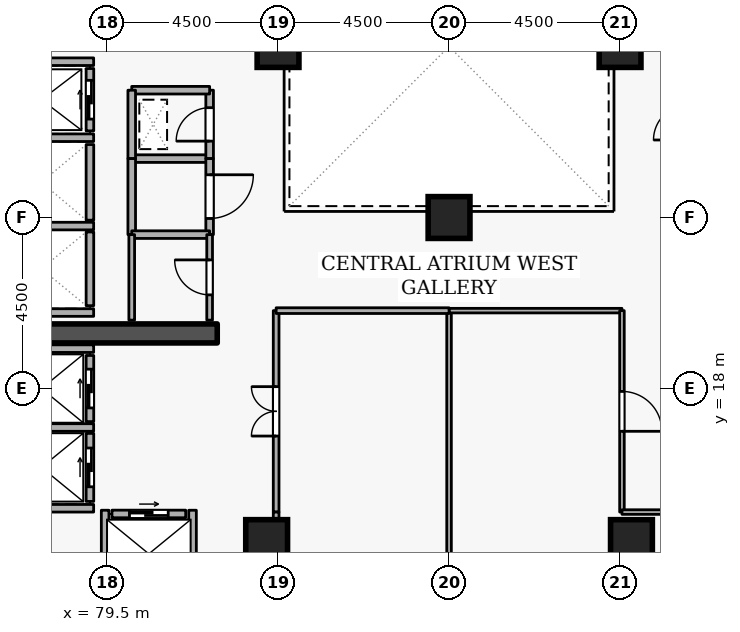
"""IFC4 building model, lengths in metres.
Left out: names, types, materials, properties, quantities, classifications, styles, units other than length and angle.
Written with IfcOpenShell. Run it as: python <this file> out.ifc"""

import sys

from ifc_helpers import new_model, si_unit, direction, frame, frame_2d, origin, origin_2d, place, context, subcontext, project, spatial, rectangle, extrude, element, fill, save


model = new_model("IFC4")
c1 = context("Model", 3, precision=1e-05, world=origin(), true_north=direction((0.0, 1.0)))
c2 = subcontext(c1, "Body", "Model", "MODEL_VIEW")
j1 = project(units=[si_unit("LENGTHUNIT", "METRE"), si_unit("PLANEANGLEUNIT", "RADIAN")], contexts=[c1])
p1 = place(None, origin())
s1 = spatial("IfcSite", under=j1, at=p1, CompositionType="ELEMENT")
p2 = place(p1, origin())
s2 = spatial("IfcBuilding", under=s1, at=p2, CompositionType="ELEMENT")
p3 = place(p2, frame((0.0, 0.0, 156.3)))
s3 = spatial("IfcBuildingStorey", under=s2, at=p3, CompositionType="ELEMENT", Elevation=156.3)
p4 = place(p3, frame((76.6, 19.45, 0.0), z_axis=(0.0, 0.0, 1.0), x_axis=(1.0, 0.0, 0.0)))
e1 = element("IfcWall", 1, at=p4, inside=s3, PredefinedType="SHEAR", context=c2, shape_type="SweptSolid", body=[
    extrude(rectangle(XDim=5.8, YDim=0.5, at=frame_2d((2.9, 0.0))), origin(), (0.0, 0.0, 1.0), 3.6),
])
for number, where, z_axis, x_axis in (
    (2, (93.3, 14.0, 0.0), (0.0, 0.0, 1.0), (1.0, 0.0, 0.0)),
    (3, (83.7, 14.0, 0.0), (0.0, 0.0, 1.0), (1.0, 0.0, 0.0)),
    (4, (93.0, 27.0, 0.0), (0.0, 0.0, 1.0), (1.0, 0.0, 0.0)),
    (5, (84.0, 27.0, 0.0), (0.0, 0.0, 1.0), (1.0, 0.0, 0.0)),
    (6, (88.5, 22.5, 0.0), (0.0, 0.0, 1.0), (1.0, 0.0, 0.0)),
):
    element("IfcColumn", number, at=place(p3, frame(where, z_axis=z_axis, x_axis=x_axis)), inside=s3, PredefinedType="COLUMN", context=c2, shape_type="SweptSolid", body=[
        extrude(rectangle(XDim=1.1, YDim=1.1, at=origin_2d()), origin(), (0.0, 0.0, 1.0), 3.6),
    ])
p5 = place(p3, frame((79.05, 24.78, 0.0), z_axis=(0.0, 0.0, 1.0), x_axis=(0.0, 1.0, 0.0)))
e7 = element("IfcWall", 7, at=p5, inside=s3, PredefinedType="STANDARD", context=c2, shape_type="SweptSolid", body=[
    extrude(rectangle(XDim=1.64, YDim=0.2, at=frame_2d((0.82, 0.0))), origin(), (0.0, 0.0, 1.0), 3.34),
])
p6 = place(p5, frame((0.31, 0.0, 0.0)))
e8 = element("IfcOpeningElement", 8, at=p6, cuts=e7, PredefinedType="OPENING", context=c2, shape_type="SweptSolid", body=[
    extrude(rectangle(XDim=1.02, YDim=2.06, at=frame_2d((0.51, 1.03))), frame((0.0, 0.11, 0.0), z_axis=(0.0, -1.0, 0.0), x_axis=(1.0, 0.0, 0.0)), (0.0, 0.0, 1.0), 0.22),
])
p7 = place(p3, frame((79.05, 22.43, 0.0), z_axis=(0.0, 0.0, 1.0), x_axis=(0.0, 1.0, 0.0)))
e9 = element("IfcWall", 9, at=p7, inside=s3, PredefinedType="STANDARD", context=c2, shape_type="SweptSolid", body=[
    extrude(rectangle(XDim=1.99, YDim=0.2, at=frame_2d((0.995, 0.0))), origin(), (0.0, 0.0, 1.0), 3.34),
])
p8 = place(p3, frame((79.05, 20.18, 0.0), z_axis=(0.0, 0.0, 1.0), x_axis=(0.0, 1.0, 0.0)))
e10 = element("IfcWall", 10, at=p8, inside=s3, PredefinedType="STANDARD", context=c2, shape_type="SweptSolid", body=[
    extrude(rectangle(XDim=1.94, YDim=0.2, at=frame_2d((0.97, 0.0))), origin(), (0.0, 0.0, 1.0), 3.34),
])
p9 = place(p3, frame((79.05, 17.13, 0.0), z_axis=(0.0, 0.0, 1.0), x_axis=(0.0, 1.0, 0.0)))
e11 = element("IfcWall", 11, at=p9, inside=s3, PredefinedType="STANDARD", context=c2, shape_type="SweptSolid", body=[
    extrude(rectangle(XDim=1.74, YDim=0.2, at=frame_2d((0.87, 0.0))), origin(), (0.0, 0.0, 1.0), 3.34),
])
p10 = place(p9, frame((0.36, 0.0, 0.0)))
e12 = element("IfcOpeningElement", 12, at=p10, cuts=e11, PredefinedType="OPENING", context=c2, shape_type="SweptSolid", body=[
    extrude(rectangle(XDim=1.02, YDim=2.06, at=frame_2d((0.51, 1.03))), frame((0.0, 0.11, 0.0), z_axis=(0.0, -1.0, 0.0), x_axis=(1.0, 0.0, 0.0)), (0.0, 0.0, 1.0), 0.22),
])
p11 = place(p3, frame((79.05, 15.03, 0.0), z_axis=(0.0, 0.0, 1.0), x_axis=(0.0, 1.0, 0.0)))
e13 = element("IfcWall", 13, at=p11, inside=s3, PredefinedType="STANDARD", context=c2, shape_type="SweptSolid", body=[
    extrude(rectangle(XDim=1.79, YDim=0.2, at=frame_2d((0.895, 0.0))), origin(), (0.0, 0.0, 1.0), 3.34),
])
p12 = place(p11, frame((0.385, 0.0, 0.0)))
e14 = element("IfcOpeningElement", 14, at=p12, cuts=e13, PredefinedType="OPENING", context=c2, shape_type="SweptSolid", body=[
    extrude(rectangle(XDim=1.02, YDim=2.06, at=frame_2d((0.51, 1.03))), frame((0.0, 0.11, 0.0), z_axis=(0.0, -1.0, 0.0), x_axis=(1.0, 0.0, 0.0)), (0.0, 0.0, 1.0), 0.22),
])
p13 = place(p3, frame((79.63, 14.7, 0.0), z_axis=(0.0, 0.0, 1.0), x_axis=(1.0, 0.0, 0.0)))
e15 = element("IfcWall", 15, at=p13, inside=s3, PredefinedType="STANDARD", context=c2, shape_type="SweptSolid", body=[
    extrude(rectangle(XDim=1.94, YDim=0.2, at=frame_2d((0.97, 0.0))), origin(), (0.0, 0.0, 1.0), 3.34),
])
p14 = place(p13, frame((0.46, 0.0, 0.0)))
e16 = element("IfcOpeningElement", 16, at=p14, cuts=e15, PredefinedType="OPENING", context=c2, shape_type="SweptSolid", body=[
    extrude(rectangle(XDim=1.02, YDim=2.06, at=frame_2d((0.51, 1.03))), frame((0.0, 0.11, 0.0), z_axis=(0.0, -1.0, 0.0), x_axis=(1.0, 0.0, 0.0)), (0.0, 0.0, 1.0), 0.22),
])
for number, where, z_axis, x_axis in (
    (17, (76.612, 26.6, 0.0), (0.0, 0.0, 1.0), (1.0, 0.0, 0.0)),
    (18, (76.612, 24.6, 0.0), (0.0, 0.0, 1.0), (1.0, 0.0, 0.0)),
    (19, (76.612, 22.275, 0.0), (0.0, 0.0, 1.0), (1.0, 0.0, 0.0)),
    (20, (76.612, 20.0, 0.0), (0.0, 0.0, 1.0), (1.0, 0.0, 0.0)),
):
    element("IfcWall", number, at=place(p3, frame(where, z_axis=z_axis, x_axis=x_axis)), inside=s3, PredefinedType="STANDARD", context=c2, shape_type="SweptSolid", body=[
        extrude(rectangle(XDim=2.536, YDim=0.2, at=frame_2d((1.268, 0.0))), origin(), (0.0, 0.0, 1.0), 3.34),
    ])
p15 = place(p3, frame((76.402, 19.05, 0.0), z_axis=(0.0, 0.0, 1.0), x_axis=(1.0, 0.0, 0.0)))
e21 = element("IfcWall", 21, at=p15, inside=s3, PredefinedType="STANDARD", context=c2, shape_type="SweptSolid", body=[
    extrude(rectangle(XDim=2.746, YDim=0.2, at=frame_2d((1.373, 0.0))), origin(), (0.0, 0.0, 1.0), 2.545),
])
p16 = place(p3, frame((76.402, 16.975, 0.0), z_axis=(0.0, 0.0, 1.0), x_axis=(1.0, 0.0, 0.0)))
e22 = element("IfcWall", 22, at=p16, inside=s3, PredefinedType="STANDARD", context=c2, shape_type="SweptSolid", body=[
    extrude(rectangle(XDim=2.746, YDim=0.2, at=frame_2d((1.373, 0.0))), origin(), (0.0, 0.0, 1.0), 3.34),
])
p17 = place(p3, frame((76.512, 14.85, 0.0), z_axis=(0.0, 0.0, 1.0), x_axis=(1.0, 0.0, 0.0)))
e23 = element("IfcWall", 23, at=p17, inside=s3, PredefinedType="STANDARD", context=c2, shape_type="SweptSolid", body=[
    extrude(rectangle(XDim=2.636, YDim=0.2, at=frame_2d((1.318, 0.0))), origin(), (0.0, 0.0, 1.0), 3.34),
])
for number, where, z_axis, x_axis in (
    (24, (81.75, 12.612, 0.0), (0.0, 0.0, 1.0), (0.0, 1.0, 0.0)),
    (25, (79.45, 12.612, 0.0), (0.0, 0.0, 1.0), (0.0, 1.0, 0.0)),
):
    element("IfcWall", number, at=place(p3, frame(where, z_axis=z_axis, x_axis=x_axis)), inside=s3, PredefinedType="STANDARD", context=c2, shape_type="SweptSolid", body=[
        extrude(rectangle(XDim=2.186, YDim=0.2, at=frame_2d((1.093, 0.0))), origin(), (0.0, 0.0, 1.0), 3.34),
    ])
p18 = place(p3, frame((80.15, 24.05, 0.0), z_axis=(0.0, 0.0, 1.0), x_axis=(1.0, 0.0, 0.0)))
e26 = element("IfcWall", 26, at=p18, inside=s3, PredefinedType="STANDARD", context=c2, shape_type="SweptSolid", body=[
    extrude(rectangle(XDim=2.05, YDim=0.2, at=frame_2d((1.025, 0.0))), origin(), (0.0, 0.0, 1.0), 3.34),
])
p19 = place(p3, frame((82.2, 24.05, 0.0), z_axis=(0.0, 0.0, 1.0), x_axis=(0.0, 1.0, 0.0)))
e27 = element("IfcWall", 27, at=p19, inside=s3, PredefinedType="STANDARD", context=c2, shape_type="SweptSolid", body=[
    extrude(rectangle(XDim=1.8, YDim=0.2, at=frame_2d((0.9, 0.0))), origin(), (0.0, 0.0, 1.0), 3.34),
])
p20 = place(p19, frame((0.46, 0.0, 0.0)))
e28 = element("IfcOpeningElement", 28, at=p20, cuts=e27, PredefinedType="OPENING", context=c2, shape_type="SweptSolid", body=[
    extrude(rectangle(XDim=0.88, YDim=2.04, at=frame_2d((0.44, 1.02))), frame((0.0, 0.11, 0.0), z_axis=(0.0, -1.0, 0.0), x_axis=(1.0, 0.0, 0.0)), (0.0, 0.0, 1.0), 0.22),
])
p21 = place(p3, frame((82.2, 25.85, 0.0), z_axis=(0.0, 0.0, 1.0), x_axis=(-1.0, 0.0, 0.0)))
e29 = element("IfcWall", 29, at=p21, inside=s3, PredefinedType="STANDARD", context=c2, shape_type="SweptSolid", body=[
    extrude(rectangle(XDim=2.05, YDim=0.2, at=frame_2d((1.025, 0.0))), origin(), (0.0, 0.0, 1.0), 3.34),
])
p22 = place(p3, frame((80.15, 25.85, 0.0), z_axis=(0.0, 0.0, 1.0), x_axis=(0.0, -1.0, 0.0)))
e30 = element("IfcWall", 30, at=p22, inside=s3, PredefinedType="STANDARD", context=c2, shape_type="SweptSolid", body=[
    extrude(rectangle(XDim=1.8, YDim=0.2, at=frame_2d((0.9, 0.0))), origin(), (0.0, 0.0, 1.0), 3.34),
])
p23 = place(p3, frame((80.15, 22.05, 0.0), z_axis=(0.0, 0.0, 1.0), x_axis=(0.0, 1.0, 0.0)))
e31 = element("IfcWall", 31, at=p23, inside=s3, PredefinedType="STANDARD", context=c2, shape_type="SweptSolid", body=[
    extrude(rectangle(XDim=2.0, YDim=0.2, at=frame_2d((1.0, 0.0))), origin(), (0.0, 0.0, 1.0), 3.34),
])
p24 = place(p3, frame((82.2, 24.05, 0.0), z_axis=(0.0, 0.0, 1.0), x_axis=(0.0, -1.0, 0.0)))
e32 = element("IfcWall", 32, at=p24, inside=s3, PredefinedType="STANDARD", context=c2, shape_type="SweptSolid", body=[
    extrude(rectangle(XDim=2.0, YDim=0.2, at=frame_2d((1.0, 0.0))), origin(), (0.0, 0.0, 1.0), 3.34),
])
p25 = place(p24, frame((0.425, 0.0, 0.0)))
e33 = element("IfcOpeningElement", 33, at=p25, cuts=e32, PredefinedType="OPENING", context=c2, shape_type="SweptSolid", body=[
    extrude(rectangle(XDim=1.15, YDim=2.1, at=frame_2d((0.575, 1.05))), frame((0.0, 0.11, 0.0), z_axis=(0.0, -1.0, 0.0), x_axis=(1.0, 0.0, 0.0)), (0.0, 0.0, 1.0), 0.22),
])
p26 = place(p3, frame((82.2, 22.05, 0.0), z_axis=(0.0, 0.0, 1.0), x_axis=(-1.0, 0.0, 0.0)))
e34 = element("IfcWall", 34, at=p26, inside=s3, PredefinedType="STANDARD", context=c2, shape_type="SweptSolid", body=[
    extrude(rectangle(XDim=2.05, YDim=0.2, at=frame_2d((1.025, 0.0))), origin(), (0.0, 0.0, 1.0), 3.34),
])
p27 = place(p3, frame((82.2, 19.8, 0.0), z_axis=(0.0, 0.0, 1.0), x_axis=(0.0, 1.0, 0.0)))
e35 = element("IfcWall", 35, at=p27, inside=s3, PredefinedType="PARTITIONING", context=c2, shape_type="SweptSolid", body=[
    extrude(rectangle(XDim=2.25, YDim=0.15, at=frame_2d((1.125, 0.0))), origin(), (0.0, 0.0, 1.0), 3.34),
])
p28 = place(p27, frame((0.665, 0.0, 0.0)))
e36 = element("IfcOpeningElement", 36, at=p28, cuts=e35, PredefinedType="OPENING", context=c2, shape_type="SweptSolid", body=[
    extrude(rectangle(XDim=0.92, YDim=2.08, at=frame_2d((0.46, 1.04))), frame((0.0, 0.085, 0.0), z_axis=(0.0, -1.0, 0.0), x_axis=(1.0, 0.0, 0.0)), (0.0, 0.0, 1.0), 0.17),
])
p29 = place(p3, frame((80.15, 22.05, 0.0), z_axis=(0.0, 0.0, 1.0), x_axis=(0.0, -1.0, 0.0)))
e37 = element("IfcWall", 37, at=p29, inside=s3, PredefinedType="PARTITIONING", context=c2, shape_type="SweptSolid", body=[
    extrude(rectangle(XDim=2.25, YDim=0.15, at=frame_2d((1.125, 0.0))), origin(), (0.0, 0.0, 1.0), 3.34),
])
p30 = place(p3, frame((88.5, 9.28, 0.0), z_axis=(0.0, 0.0, 1.0), x_axis=(0.0, 1.0, 0.0)))
e38 = element("IfcWall", 38, at=p30, inside=s3, PredefinedType="PARTITIONING", context=c2, shape_type="SweptSolid", body=[
    extrude(rectangle(XDim=10.77, YDim=0.12, at=frame_2d((5.385, 0.0))), origin(), (0.0, 0.0, 1.0), 2.932),
])
p31 = place(p3, frame((88.5, 20.05, 0.0), z_axis=(0.0, 0.0, 1.0), x_axis=(1.0, 0.0, 0.0)))
e39 = element("IfcWall", 39, at=p31, inside=s3, PredefinedType="PARTITIONING", context=c2, shape_type="SweptSolid", body=[
    extrude(rectangle(XDim=4.55, YDim=0.12, at=frame_2d((2.275, 0.0))), origin(), (0.0, 0.0, 1.0), 3.34),
])
p32 = place(p3, frame((93.05, 20.05, 0.0), z_axis=(0.0, 0.0, 1.0), x_axis=(0.0, -1.0, 0.0)))
e40 = element("IfcWall", 40, at=p32, inside=s3, PredefinedType="PARTITIONING", context=c2, shape_type="SweptSolid", body=[
    extrude(rectangle(XDim=5.3, YDim=0.12, at=frame_2d((2.65, 0.0))), origin(), (0.0, 0.0, 1.0), 3.34),
])
p33 = place(p32, frame((2.125, 0.0, 0.0)))
e41 = element("IfcOpeningElement", 41, at=p33, cuts=e40, PredefinedType="OPENING", context=c2, shape_type="SweptSolid", body=[
    extrude(rectangle(XDim=1.05, YDim=2.1, at=frame_2d((0.525, 1.05))), frame((0.0, 0.07, 0.0), z_axis=(0.0, -1.0, 0.0), x_axis=(1.0, 0.0, 0.0)), (0.0, 0.0, 1.0), 0.14),
])
p34 = place(p3, frame((93.05, 14.75, 0.0), z_axis=(0.0, 0.0, 1.0), x_axis=(1.0, 0.0, 0.0)))
e42 = element("IfcWall", 42, at=p34, inside=s3, PredefinedType="PARTITIONING", context=c2, shape_type="SweptSolid", body=[
    extrude(rectangle(XDim=1.75, YDim=0.12, at=frame_2d((0.875, 0.0))), origin(), (0.0, 0.0, 1.0), 3.34),
])
p35 = place(p3, frame((83.95, 14.75, 0.0), z_axis=(0.0, 0.0, 1.0), x_axis=(0.0, 1.0, 0.0)))
e43 = element("IfcWall", 43, at=p35, inside=s3, PredefinedType="PARTITIONING", context=c2, shape_type="SweptSolid", body=[
    extrude(rectangle(XDim=5.3, YDim=0.15, at=frame_2d((2.65, 0.0))), origin(), (0.0, 0.0, 1.0), 3.34),
])
p36 = place(p35, frame((2.0, 0.0, 0.0)))
e44 = element("IfcOpeningElement", 44, at=p36, cuts=e43, PredefinedType="OPENING", context=c2, shape_type="SweptSolid", body=[
    extrude(rectangle(XDim=1.3, YDim=2.12, at=frame_2d((0.65, 1.06))), frame((0.0, 0.085, 0.0), z_axis=(0.0, -1.0, 0.0), x_axis=(1.0, 0.0, 0.0)), (0.0, 0.0, 1.0), 0.17),
])
p37 = place(p3, frame((83.95, 20.05, 0.0), z_axis=(0.0, 0.0, 1.0), x_axis=(1.0, 0.0, 0.0)))
e45 = element("IfcWall", 45, at=p37, inside=s3, PredefinedType="PARTITIONING", context=c2, shape_type="SweptSolid", body=[
    extrude(rectangle(XDim=4.55, YDim=0.15, at=frame_2d((2.275, 0.0))), origin(), (0.0, 0.0, 1.0), 3.34),
])
p38 = place(p3, frame((83.95, 12.4, 0.0), z_axis=(0.0, 0.0, 1.0), x_axis=(0.0, 1.0, 0.0)))
e46 = element("IfcWall", 46, at=p38, inside=s3, PredefinedType="PARTITIONING", context=c2, shape_type="SweptSolid", body=[
    extrude(rectangle(XDim=2.35, YDim=0.15, at=frame_2d((1.175, 0.0))), origin(), (0.0, 0.0, 1.0), 3.34),
])
p39 = place(p6, origin())
e47 = element("IfcDoor", 47, at=p39, inside=s3, OperationType="SLIDING_TO_LEFT", PredefinedType="DOOR", context=c2, shape_type="SweptSolid", body=[
    extrude(rectangle(XDim=1.02, YDim=2.06, at=frame_2d((0.51, 1.03))), frame((0.0, 0.025, 0.0), z_axis=(0.0, -1.0, 0.0), x_axis=(1.0, 0.0, 0.0)), (0.0, 0.0, 1.0), 0.05),
])
fill(e8, e47)
p40 = place(p10, origin())
e48 = element("IfcDoor", 48, at=p40, inside=s3, OperationType="SLIDING_TO_LEFT", PredefinedType="DOOR", context=c2, shape_type="SweptSolid", body=[
    extrude(rectangle(XDim=1.02, YDim=2.06, at=frame_2d((0.51, 1.03))), frame((0.0, 0.025, 0.0), z_axis=(0.0, -1.0, 0.0), x_axis=(1.0, 0.0, 0.0)), (0.0, 0.0, 1.0), 0.05),
])
fill(e12, e48)
p41 = place(p12, origin())
e49 = element("IfcDoor", 49, at=p41, inside=s3, OperationType="SLIDING_TO_LEFT", PredefinedType="DOOR", context=c2, shape_type="SweptSolid", body=[
    extrude(rectangle(XDim=1.02, YDim=2.06, at=frame_2d((0.51, 1.03))), frame((0.0, 0.025, 0.0), z_axis=(0.0, -1.0, 0.0), x_axis=(1.0, 0.0, 0.0)), (0.0, 0.0, 1.0), 0.05),
])
fill(e14, e49)
p42 = place(p14, origin())
e50 = element("IfcDoor", 50, at=p42, inside=s3, OperationType="SLIDING_TO_LEFT", PredefinedType="DOOR", context=c2, shape_type="SweptSolid", body=[
    extrude(rectangle(XDim=1.02, YDim=2.06, at=frame_2d((0.51, 1.03))), frame((0.0, 0.025, 0.0), z_axis=(0.0, -1.0, 0.0), x_axis=(1.0, 0.0, 0.0)), (0.0, 0.0, 1.0), 0.05),
])
fill(e16, e50)
p43 = place(p20, origin())
e51 = element("IfcDoor", 51, at=p43, inside=s3, OperationType="SINGLE_SWING_LEFT", PredefinedType="DOOR", context=c2, shape_type="SweptSolid", body=[
    extrude(rectangle(XDim=0.88, YDim=2.04, at=frame_2d((0.44, 1.02))), frame((0.0, 0.025, 0.0), z_axis=(0.0, -1.0, 0.0), x_axis=(1.0, 0.0, 0.0)), (0.0, 0.0, 1.0), 0.05),
])
fill(e28, e51)
p44 = place(p28, origin())
e52 = element("IfcDoor", 52, at=p44, inside=s3, OperationType="SINGLE_SWING_RIGHT", PredefinedType="DOOR", context=c2, shape_type="SweptSolid", body=[
    extrude(rectangle(XDim=0.92, YDim=2.08, at=frame_2d((0.46, 1.04))), frame((0.0, 0.025, 0.0), z_axis=(0.0, -1.0, 0.0), x_axis=(1.0, 0.0, 0.0)), (0.0, 0.0, 1.0), 0.05),
])
fill(e36, e52)
p45 = place(p25, origin())
e53 = element("IfcDoor", 53, at=p45, inside=s3, OperationType="SINGLE_SWING_LEFT", PredefinedType="DOOR", context=c2, shape_type="SweptSolid", body=[
    extrude(rectangle(XDim=1.15, YDim=2.1, at=frame_2d((0.575, 1.05))), frame((0.0, 0.025, 0.0), z_axis=(0.0, -1.0, 0.0), x_axis=(1.0, 0.0, 0.0)), (0.0, 0.0, 1.0), 0.05),
])
fill(e33, e53)
p46 = place(p33, origin())
e54 = element("IfcDoor", 54, at=p46, inside=s3, OperationType="SINGLE_SWING_RIGHT", PredefinedType="DOOR", context=c2, shape_type="SweptSolid", body=[
    extrude(rectangle(XDim=1.05, YDim=2.1, at=frame_2d((0.525, 1.05))), frame((0.0, 0.025, 0.0), z_axis=(0.0, -1.0, 0.0), x_axis=(1.0, 0.0, 0.0)), (0.0, 0.0, 1.0), 0.05),
])
fill(e41, e54)
p47 = place(p36, origin())
e55 = element("IfcDoor", 55, at=p47, inside=s3, OperationType="DOUBLE_DOOR_SINGLE_SWING", PredefinedType="DOOR", context=c2, shape_type="SweptSolid", body=[
    extrude(rectangle(XDim=1.3, YDim=2.12, at=frame_2d((0.65, 1.06))), frame((0.0, 0.025, 0.0), z_axis=(0.0, -1.0, 0.0), x_axis=(1.0, 0.0, 0.0)), (0.0, 0.0, 1.0), 0.05),
])
fill(e44, e55)
save(model, sys.argv[1])
